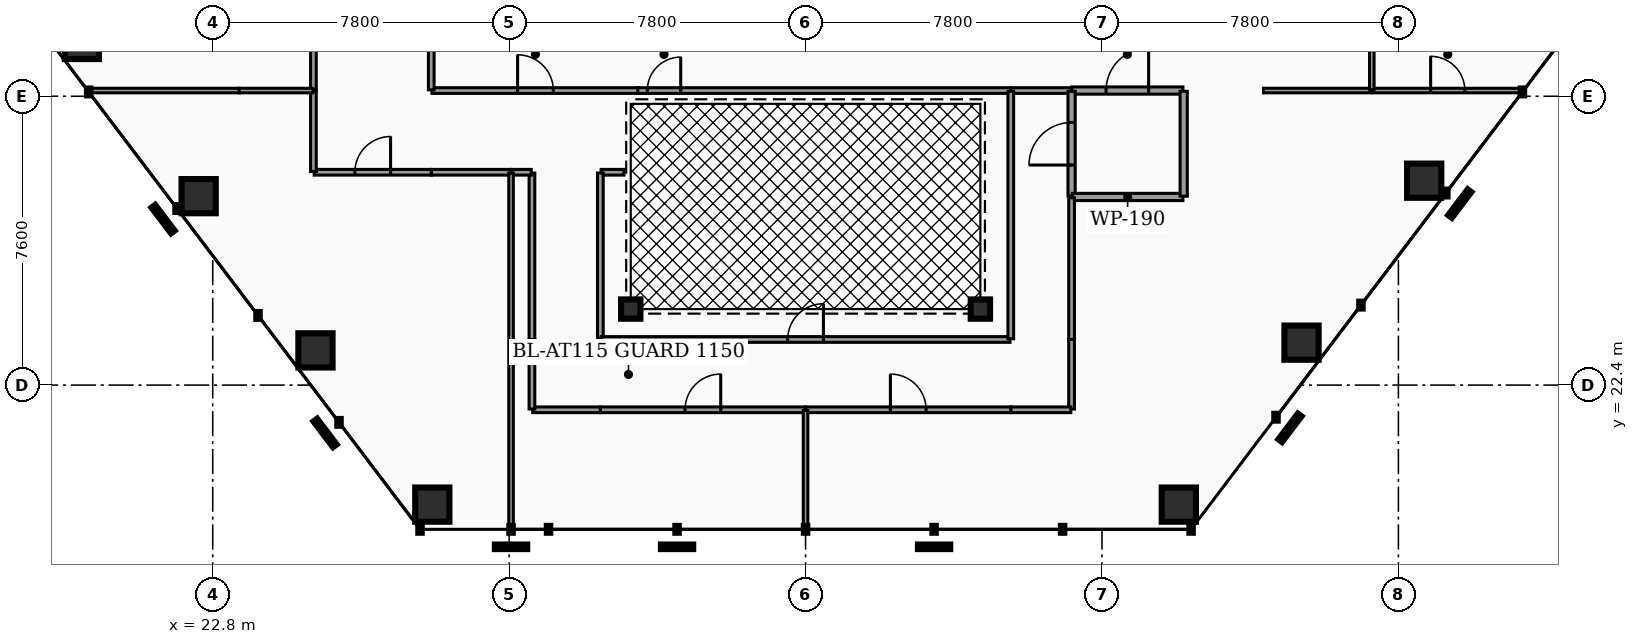
"""IFC4 building model, lengths in metres.
Left out: names, types, materials, properties, quantities, classifications, styles, units other than length and angle.
Written with IfcOpenShell. Run it as: python <this file> out.ifc"""

import sys

from ifc_helpers import new_model, si_unit, direction, frame, frame_2d, origin, origin_2d, place, context, subcontext, project, spatial, rectangle, hollow_rectangle, hollow_circle, extrude, element, fill, save


model = new_model("IFC4")
c1 = context("Model", 3, precision=1e-05, world=origin(), true_north=direction((0.0, 1.0)))
c2 = subcontext(c1, "Body", "Model", "MODEL_VIEW")
j1 = project(units=[si_unit("LENGTHUNIT", "METRE"), si_unit("PLANEANGLEUNIT", "RADIAN")], contexts=[c1])
p1 = place(None, origin())
s1 = spatial("IfcSite", under=j1, at=p1, CompositionType="ELEMENT")
p2 = place(p1, origin())
s2 = spatial("IfcBuilding", under=s1, at=p2, CompositionType="ELEMENT")
p3 = place(p2, frame((0.0, 0.0, 76.5)))
s3 = spatial("IfcBuildingStorey", under=s2, at=p3, CompositionType="ELEMENT", Elevation=76.5)
for number, where, z_axis, x_axis in (
    (1, (19.355, 31.429, 0.0), (0.0, 0.0, 1.0), (1.0, 0.0, 0.0)),
    (2, (22.429, 27.371, 0.0), (0.0, 0.0, 1.0), (1.0, 0.0, 0.0)),
    (3, (25.504, 23.313, 0.0), (0.0, 0.0, 1.0), (1.0, 0.0, 0.0)),
    (4, (28.578, 19.255, 0.0), (0.0, 0.0, 1.0), (1.0, 0.0, 0.0)),
    (5, (48.222, 19.255, 0.0), (0.0, 0.0, 1.0), (1.0, 0.0, 0.0)),
    (6, (51.451, 23.517, 0.0), (0.0, 0.0, 1.0), (1.0, 0.0, 0.0)),
    (7, (54.679, 27.778, 0.0), (0.0, 0.0, 1.0), (1.0, 0.0, 0.0)),
):
    element("IfcColumn", number, at=place(p3, frame(where, z_axis=z_axis, x_axis=x_axis)), inside=s3, PredefinedType="COLUMN", context=c2, shape_type="SweptSolid", body=[
        extrude(hollow_rectangle(XDim=0.9, YDim=0.9, WallThickness=0.045, at=origin_2d()), origin(), (0.0, 0.0, 1.0), 3.82),
    ])
for number, where, z_axis, x_axis in (
    (8, (33.8, 24.4, 0.0), (0.0, 0.0, 1.0), (1.0, 0.0, 0.0)),
    (9, (43.0, 24.4, 0.0), (0.0, 0.0, 1.0), (1.0, 0.0, 0.0)),
):
    element("IfcColumn", number, at=place(p3, frame(where, z_axis=z_axis, x_axis=x_axis)), inside=s3, PredefinedType="COLUMN", context=c2, shape_type="SweptSolid", body=[
        extrude(hollow_circle(Radius=0.254, WallThickness=0.02, at=origin_2d()), origin(), (0.0, 0.0, 1.0), 3.82),
    ])
p4 = place(p3, frame((45.405, 30.15, 0.0), z_axis=(0.0, 0.0, 1.0), x_axis=(1.0, 0.0, 0.0)))
e10 = element("IfcWall", 10, at=p4, inside=s3, PredefinedType="PARTITIONING", context=c2, shape_type="SweptSolid", body=[
    extrude(rectangle(XDim=2.925, YDim=0.19, at=frame_2d((1.462, 0.0))), origin(), (0.0, 0.0, 1.0), 2.777),
])
p5 = place(p4, frame((0.903, 0.0, 0.0)))
e11 = element("IfcOpeningElement", 11, at=p5, cuts=e10, PredefinedType="OPENING", context=c2, shape_type="SweptSolid", body=[
    extrude(rectangle(XDim=1.12, YDim=2.05, at=frame_2d((0.56, 1.025))), frame((0.0, 0.105, 0.0), z_axis=(0.0, -1.0, 0.0), x_axis=(1.0, 0.0, 0.0)), (0.0, 0.0, 1.0), 0.21),
])
p6 = place(p3, frame((43.805, 30.15, 0.0), z_axis=(0.0, 0.0, 1.0), x_axis=(1.0, 0.0, 0.0)))
e12 = element("IfcWall", 12, at=p6, inside=s3, PredefinedType="PARTITIONING", context=c2, shape_type="SweptSolid", body=[
    extrude(rectangle(XDim=1.59, YDim=0.15, at=frame_2d((0.795, 0.0))), origin(), (0.0, 0.0, 1.0), 2.777),
])
p7 = place(p3, frame((28.57, 30.15, 0.0), z_axis=(0.0, 0.0, 1.0), x_axis=(1.0, 0.0, 0.0)))
e13 = element("IfcWall", 13, at=p7, inside=s3, PredefinedType="PARTITIONING", context=c2, shape_type="SweptSolid", body=[
    extrude(rectangle(XDim=5.445, YDim=0.15, at=frame_2d((2.722, 0.0))), origin(), (0.0, 0.0, 1.0), 2.777),
])
p8 = place(p7, frame((2.252, 0.0, 0.0)))
e14 = element("IfcOpeningElement", 14, at=p8, cuts=e13, PredefinedType="OPENING", context=c2, shape_type="SweptSolid", body=[
    extrude(rectangle(XDim=0.94, YDim=2.05, at=frame_2d((0.47, 1.025))), frame((0.0, 0.085, 0.0), z_axis=(0.0, -1.0, 0.0), x_axis=(1.0, 0.0, 0.0)), (0.0, 0.0, 1.0), 0.17),
])
p9 = place(p3, frame((28.55, 30.17, 0.0), z_axis=(0.0, 0.0, 1.0), x_axis=(0.0, 1.0, 0.0)))
e15 = element("IfcWall", 15, at=p9, inside=s3, PredefinedType="PARTITIONING", context=c2, shape_type="SweptSolid", body=[
    extrude(rectangle(XDim=3.065, YDim=0.15, at=frame_2d((1.533, 0.0))), origin(), (0.0, 0.0, 1.0), 2.777),
])
p10 = place(p3, frame((33.985, 30.15, 0.0), z_axis=(0.0, 0.0, 1.0), x_axis=(1.0, 0.0, 0.0)))
e16 = element("IfcWall", 16, at=p10, inside=s3, PredefinedType="PARTITIONING", context=c2, shape_type="SweptSolid", body=[
    extrude(rectangle(XDim=9.81, YDim=0.15, at=frame_2d((4.905, 0.0))), origin(), (0.0, 0.0, 1.0), 2.777),
])
p11 = place(p10, frame((0.25, 0.0, 0.0)))
e17 = element("IfcOpeningElement", 17, at=p11, cuts=e16, PredefinedType="OPENING", context=c2, shape_type="SweptSolid", body=[
    extrude(rectangle(XDim=0.88, YDim=2.05, at=frame_2d((0.44, 1.025))), frame((0.0, 0.085, 0.0), z_axis=(0.0, -1.0, 0.0), x_axis=(1.0, 0.0, 0.0)), (0.0, 0.0, 1.0), 0.17),
])
p12 = place(p3, frame((45.4, 27.37, 0.0), z_axis=(0.0, 0.0, 1.0), x_axis=(0.0, 1.0, 0.0)))
e18 = element("IfcWall", 18, at=p12, inside=s3, PredefinedType="PARTITIONING", context=c2, shape_type="SweptSolid", body=[
    extrude(rectangle(XDim=2.76, YDim=0.19, at=frame_2d((1.38, 0.0))), origin(), (0.0, 0.0, 1.0), 2.777),
])
p13 = place(p12, frame((0.82, 0.0, 0.0)))
e19 = element("IfcOpeningElement", 19, at=p13, cuts=e18, PredefinedType="OPENING", context=c2, shape_type="SweptSolid", body=[
    extrude(rectangle(XDim=1.12, YDim=2.05, at=frame_2d((0.56, 1.025))), frame((0.0, 0.105, 0.0), z_axis=(0.0, -1.0, 0.0), x_axis=(1.0, 0.0, 0.0)), (0.0, 0.0, 1.0), 0.21),
])
p14 = place(p3, frame((45.42, 27.35, 0.0), z_axis=(0.0, 0.0, 1.0), x_axis=(1.0, 0.0, 0.0)))
e20 = element("IfcWall", 20, at=p14, inside=s3, PredefinedType="PARTITIONING", context=c2, shape_type="SweptSolid", body=[
    extrude(rectangle(XDim=2.91, YDim=0.19, at=frame_2d((1.455, 0.0))), origin(), (0.0, 0.0, 1.0), 2.777),
])
p15 = place(p3, frame((48.35, 27.37, 0.0), z_axis=(0.0, 0.0, 1.0), x_axis=(0.0, 1.0, 0.0)))
e21 = element("IfcWall", 21, at=p15, inside=s3, PredefinedType="PARTITIONING", context=c2, shape_type="SweptSolid", body=[
    extrude(rectangle(XDim=2.76, YDim=0.19, at=frame_2d((1.38, 0.0))), origin(), (0.0, 0.0, 1.0), 2.777),
])
p16 = place(p3, frame((33.0, 21.75, 0.0), z_axis=(0.0, 0.0, 1.0), x_axis=(1.0, 0.0, 0.0)))
e22 = element("IfcWall", 22, at=p16, inside=s3, PredefinedType="PARTITIONING", context=c2, shape_type="SweptSolid", body=[
    extrude(rectangle(XDim=5.395, YDim=0.15, at=frame_2d((2.698, 0.0))), origin(), (0.0, 0.0, 1.0), 2.777),
])
p17 = place(p16, frame((2.228, 0.0, 0.0)))
e23 = element("IfcOpeningElement", 23, at=p17, cuts=e22, PredefinedType="OPENING", context=c2, shape_type="SweptSolid", body=[
    extrude(rectangle(XDim=0.94, YDim=2.05, at=frame_2d((0.47, 1.025))), frame((0.0, 0.085, 0.0), z_axis=(0.0, -1.0, 0.0), x_axis=(1.0, 0.0, 0.0)), (0.0, 0.0, 1.0), 0.17),
])
p18 = place(p3, frame((31.22, 21.75, 0.0), z_axis=(0.0, 0.0, 1.0), x_axis=(1.0, 0.0, 0.0)))
e24 = element("IfcWall", 24, at=p18, inside=s3, PredefinedType="PARTITIONING", context=c2, shape_type="SweptSolid", body=[
    extrude(rectangle(XDim=1.78, YDim=0.15, at=frame_2d((0.89, 0.0))), origin(), (0.0, 0.0, 1.0), 2.777),
])
p19 = place(p3, frame((31.2, 21.77, 0.0), z_axis=(0.0, 0.0, 1.0), x_axis=(0.0, 1.0, 0.0)))
e25 = element("IfcWall", 25, at=p19, inside=s3, PredefinedType="PARTITIONING", context=c2, shape_type="SweptSolid", body=[
    extrude(rectangle(XDim=1.83, YDim=0.15, at=frame_2d((0.915, 0.0))), origin(), (0.0, 0.0, 1.0), 2.777),
])
p20 = place(p3, frame((31.2, 23.6, 0.0), z_axis=(0.0, 0.0, 1.0), x_axis=(0.0, 1.0, 0.0)))
e26 = element("IfcWall", 26, at=p20, inside=s3, PredefinedType="PARTITIONING", context=c2, shape_type="SweptSolid", body=[
    extrude(rectangle(XDim=4.38, YDim=0.15, at=frame_2d((2.19, 0.0))), origin(), (0.0, 0.0, 1.0), 2.777),
])
p21 = place(p3, frame((30.655, 28.0, 0.0), z_axis=(0.0, 0.0, 1.0), x_axis=(1.0, 0.0, 0.0)))
e27 = element("IfcWall", 27, at=p21, inside=s3, PredefinedType="PARTITIONING", context=c2, shape_type="SweptSolid", body=[
    extrude(rectangle(XDim=0.525, YDim=0.15, at=frame_2d((0.262, 0.0))), origin(), (0.0, 0.0, 1.0), 2.777),
])
p22 = place(p3, frame((45.4, 23.6, 0.0), z_axis=(0.0, 0.0, 1.0), x_axis=(0.0, 1.0, 0.0)))
e28 = element("IfcWall", 28, at=p22, inside=s3, PredefinedType="PARTITIONING", context=c2, shape_type="SweptSolid", body=[
    extrude(rectangle(XDim=3.73, YDim=0.15, at=frame_2d((1.865, 0.0))), origin(), (0.0, 0.0, 1.0), 2.777),
])
p23 = place(p3, frame((45.4, 21.77, 0.0), z_axis=(0.0, 0.0, 1.0), x_axis=(0.0, 1.0, 0.0)))
e29 = element("IfcWall", 29, at=p23, inside=s3, PredefinedType="PARTITIONING", context=c2, shape_type="SweptSolid", body=[
    extrude(rectangle(XDim=1.83, YDim=0.15, at=frame_2d((0.915, 0.0))), origin(), (0.0, 0.0, 1.0), 2.777),
])
p24 = place(p3, frame((43.8, 21.75, 0.0), z_axis=(0.0, 0.0, 1.0), x_axis=(1.0, 0.0, 0.0)))
e30 = element("IfcWall", 30, at=p24, inside=s3, PredefinedType="PARTITIONING", context=c2, shape_type="SweptSolid", body=[
    extrude(rectangle(XDim=1.58, YDim=0.15, at=frame_2d((0.79, 0.0))), origin(), (0.0, 0.0, 1.0), 2.777),
])
p25 = place(p3, frame((38.405, 21.75, 0.0), z_axis=(0.0, 0.0, 1.0), x_axis=(1.0, 0.0, 0.0)))
e31 = element("IfcWall", 31, at=p25, inside=s3, PredefinedType="PARTITIONING", context=c2, shape_type="SweptSolid", body=[
    extrude(rectangle(XDim=5.395, YDim=0.15, at=frame_2d((2.698, 0.0))), origin(), (0.0, 0.0, 1.0), 2.777),
])
p26 = place(p25, frame((2.228, 0.0, 0.0)))
e32 = element("IfcOpeningElement", 32, at=p26, cuts=e31, PredefinedType="OPENING", context=c2, shape_type="SweptSolid", body=[
    extrude(rectangle(XDim=0.94, YDim=2.05, at=frame_2d((0.47, 1.025))), frame((0.0, 0.085, 0.0), z_axis=(0.0, -1.0, 0.0), x_axis=(1.0, 0.0, 0.0)), (0.0, 0.0, 1.0), 0.17),
])
p27 = place(p3, frame((28.55, 28.0, 0.0), z_axis=(0.0, 0.0, 1.0), x_axis=(1.0, 0.0, 0.0)))
e33 = element("IfcWall", 33, at=p27, inside=s3, PredefinedType="PARTITIONING", context=c2, shape_type="SweptSolid", body=[
    extrude(rectangle(XDim=2.095, YDim=0.15, at=frame_2d((1.047, 0.0))), origin(), (0.0, 0.0, 1.0), 2.777),
])
p28 = place(p3, frame((25.47, 28.0, 0.0), z_axis=(0.0, 0.0, 1.0), x_axis=(1.0, 0.0, 0.0)))
e34 = element("IfcWall", 34, at=p28, inside=s3, PredefinedType="PARTITIONING", context=c2, shape_type="SweptSolid", body=[
    extrude(rectangle(XDim=3.08, YDim=0.15, at=frame_2d((1.54, 0.0))), origin(), (0.0, 0.0, 1.0), 2.777),
])
p29 = place(p28, frame((1.07, 0.0, 0.0)))
e35 = element("IfcOpeningElement", 35, at=p29, cuts=e34, PredefinedType="OPENING", context=c2, shape_type="SweptSolid", body=[
    extrude(rectangle(XDim=0.94, YDim=2.05, at=frame_2d((0.47, 1.025))), frame((0.0, 0.085, 0.0), z_axis=(0.0, -1.0, 0.0), x_axis=(1.0, 0.0, 0.0)), (0.0, 0.0, 1.0), 0.17),
])
p30 = place(p3, frame((25.45, 28.02, 0.0), z_axis=(0.0, 0.0, 1.0), x_axis=(0.0, 1.0, 0.0)))
e36 = element("IfcWall", 36, at=p30, inside=s3, PredefinedType="PARTITIONING", context=c2, shape_type="SweptSolid", body=[
    extrude(rectangle(XDim=2.11, YDim=0.15, at=frame_2d((1.055, 0.0))), origin(), (0.0, 0.0, 1.0), 2.777),
])
p31 = place(p3, frame((25.45, 30.17, 0.0), z_axis=(0.0, 0.0, 1.0), x_axis=(0.0, 1.0, 0.0)))
e37 = element("IfcWall", 37, at=p31, inside=s3, PredefinedType="PARTITIONING", context=c2, shape_type="SweptSolid", body=[
    extrude(rectangle(XDim=3.115, YDim=0.15, at=frame_2d((1.558, 0.0))), origin(), (0.0, 0.0, 1.0), 2.777),
])
p32 = place(p31, frame((1.087, 0.0, 0.0)))
e38 = element("IfcOpeningElement", 38, at=p32, cuts=e37, PredefinedType="OPENING", context=c2, shape_type="SweptSolid", body=[
    extrude(rectangle(XDim=0.94, YDim=2.05, at=frame_2d((0.47, 1.025))), frame((0.0, 0.085, 0.0), z_axis=(0.0, -1.0, 0.0), x_axis=(1.0, 0.0, 0.0)), (0.0, 0.0, 1.0), 0.17),
])
p33 = place(p3, frame((33.02, 28.0, 0.0), z_axis=(0.0, 0.0, 1.0), x_axis=(1.0, 0.0, 0.0)))
e39 = element("IfcWall", 39, at=p33, inside=s3, PredefinedType="PARTITIONING", context=c2, shape_type="SweptSolid", body=[
    extrude(rectangle(XDim=0.6, YDim=0.15, at=frame_2d((0.3, 0.0))), origin(), (0.0, 0.0, 1.0), 2.777),
])
p34 = place(p3, frame((33.0, 23.62, 0.0), z_axis=(0.0, 0.0, 1.0), x_axis=(0.0, 1.0, 0.0)))
e40 = element("IfcWall", 40, at=p34, inside=s3, PredefinedType="PARTITIONING", context=c2, shape_type="SweptSolid", body=[
    extrude(rectangle(XDim=4.36, YDim=0.15, at=frame_2d((2.18, 0.0))), origin(), (0.0, 0.0, 1.0), 2.777),
])
p35 = place(p3, frame((33.02, 23.6, 0.0), z_axis=(0.0, 0.0, 1.0), x_axis=(1.0, 0.0, 0.0)))
e41 = element("IfcWall", 41, at=p35, inside=s3, PredefinedType="PARTITIONING", context=c2, shape_type="SweptSolid", body=[
    extrude(rectangle(XDim=10.76, YDim=0.15, at=frame_2d((5.38, 0.0))), origin(), (0.0, 0.0, 1.0), 2.777),
])
p36 = place(p35, frame((4.91, 0.0, 0.0)))
e42 = element("IfcOpeningElement", 42, at=p36, cuts=e41, PredefinedType="OPENING", context=c2, shape_type="SweptSolid", body=[
    extrude(rectangle(XDim=0.94, YDim=2.05, at=frame_2d((0.47, 1.025))), frame((0.0, 0.085, 0.0), z_axis=(0.0, -1.0, 0.0), x_axis=(1.0, 0.0, 0.0)), (0.0, 0.0, 1.0), 0.17),
])
p37 = place(p3, frame((43.8, 23.62, 0.0), z_axis=(0.0, 0.0, 1.0), x_axis=(0.0, 1.0, 0.0)))
e43 = element("IfcWall", 43, at=p37, inside=s3, PredefinedType="PARTITIONING", context=c2, shape_type="SweptSolid", body=[
    extrude(rectangle(XDim=6.51, YDim=0.15, at=frame_2d((3.255, 0.0))), origin(), (0.0, 0.0, 1.0), 2.777),
])
p38 = place(p3, frame((38.4, 18.62, 0.0), z_axis=(0.0, 0.0, 1.0), x_axis=(0.0, 1.0, 0.0)))
e44 = element("IfcWall", 44, at=p38, inside=s3, PredefinedType="PARTITIONING", context=c2, shape_type="SweptSolid", body=[
    extrude(rectangle(XDim=3.11, YDim=0.12, at=frame_2d((1.555, 0.0))), origin(), (0.0, 0.0, 1.0), 2.777),
])
p39 = place(p3, frame((30.65, 18.62, 0.0), z_axis=(0.0, 0.0, 1.0), x_axis=(0.0, 1.0, 0.0)))
e45 = element("IfcWall", 45, at=p39, inside=s3, PredefinedType="PARTITIONING", context=c2, shape_type="SweptSolid", body=[
    extrude(rectangle(XDim=9.36, YDim=0.12, at=frame_2d((4.68, 0.0))), origin(), (0.0, 0.0, 1.0), 2.777),
])
p40 = place(p3, frame((53.32, 30.15, 0.0), z_axis=(0.0, 0.0, 1.0), x_axis=(1.0, 0.0, 0.0)))
e46 = element("IfcWall", 46, at=p40, inside=s3, PredefinedType="PARTITIONING", context=c2, shape_type="SweptSolid", body=[
    extrude(rectangle(XDim=3.956, YDim=0.12, at=frame_2d((1.978, 0.0))), origin(), (0.0, 0.0, 1.0), 2.777),
])
p41 = place(p40, frame((1.528, 0.0, 0.0)))
e47 = element("IfcOpeningElement", 47, at=p41, cuts=e46, PredefinedType="OPENING", context=c2, shape_type="SweptSolid", body=[
    extrude(rectangle(XDim=0.9, YDim=2.05, at=frame_2d((0.45, 1.025))), frame((0.0, 0.07, 0.0), z_axis=(0.0, -1.0, 0.0), x_axis=(1.0, 0.0, 0.0)), (0.0, 0.0, 1.0), 0.14),
])
p42 = place(p3, frame((50.45, 30.15, 0.0), z_axis=(0.0, 0.0, 1.0), x_axis=(1.0, 0.0, 0.0)))
e48 = element("IfcWall", 48, at=p42, inside=s3, PredefinedType="PARTITIONING", context=c2, shape_type="SweptSolid", body=[
    extrude(rectangle(XDim=2.83, YDim=0.12, at=frame_2d((1.415, 0.0))), origin(), (0.0, 0.0, 1.0), 2.777),
])
p43 = place(p3, frame((19.524, 30.15, 0.0), z_axis=(0.0, 0.0, 1.0), x_axis=(1.0, 0.0, 0.0)))
e49 = element("IfcWall", 49, at=p43, inside=s3, PredefinedType="PARTITIONING", context=c2, shape_type="SweptSolid", body=[
    extrude(rectangle(XDim=3.976, YDim=0.12, at=frame_2d((1.988, 0.0))), origin(), (0.0, 0.0, 1.0), 2.777),
])
p44 = place(p3, frame((23.5, 30.15, 0.0), z_axis=(0.0, 0.0, 1.0), x_axis=(1.0, 0.0, 0.0)))
e50 = element("IfcWall", 50, at=p44, inside=s3, PredefinedType="PARTITIONING", context=c2, shape_type="SweptSolid", body=[
    extrude(rectangle(XDim=1.93, YDim=0.12, at=frame_2d((0.965, 0.0))), origin(), (0.0, 0.0, 1.0), 2.777),
])
p45 = place(p3, frame((53.3, 30.17, 0.0), z_axis=(0.0, 0.0, 1.0), x_axis=(0.0, 1.0, 0.0)))
e51 = element("IfcWall", 51, at=p45, inside=s3, PredefinedType="PARTITIONING", context=c2, shape_type="SweptSolid", body=[
    extrude(rectangle(XDim=17.537, YDim=0.12, at=frame_2d((8.769, 0.0))), origin(), (0.0, 0.0, 1.0), 2.777),
])
p46 = place(p5, origin())
e52 = element("IfcDoor", 52, at=p46, inside=s3, OperationType="SINGLE_SWING_RIGHT", PredefinedType="DOOR", context=c2, shape_type="SweptSolid", body=[
    extrude(rectangle(XDim=1.12, YDim=2.05, at=frame_2d((0.56, 1.025))), frame((0.0, 0.025, 0.0), z_axis=(0.0, -1.0, 0.0), x_axis=(1.0, 0.0, 0.0)), (0.0, 0.0, 1.0), 0.05),
])
fill(e11, e52)
p47 = place(p8, origin())
e53 = element("IfcDoor", 53, at=p47, inside=s3, OperationType="SINGLE_SWING_LEFT", PredefinedType="DOOR", context=c2, shape_type="SweptSolid", body=[
    extrude(rectangle(XDim=0.94, YDim=2.05, at=frame_2d((0.47, 1.025))), frame((0.0, 0.025, 0.0), z_axis=(0.0, -1.0, 0.0), x_axis=(1.0, 0.0, 0.0)), (0.0, 0.0, 1.0), 0.05),
])
fill(e14, e53)
p48 = place(p11, origin())
e54 = element("IfcDoor", 54, at=p48, inside=s3, OperationType="SINGLE_SWING_RIGHT", PredefinedType="DOOR", context=c2, shape_type="SweptSolid", body=[
    extrude(rectangle(XDim=0.88, YDim=2.05, at=frame_2d((0.44, 1.025))), frame((0.0, 0.025, 0.0), z_axis=(0.0, -1.0, 0.0), x_axis=(1.0, 0.0, 0.0)), (0.0, 0.0, 1.0), 0.05),
])
fill(e17, e54)
p49 = place(p13, origin())
e55 = element("IfcDoor", 55, at=p49, inside=s3, OperationType="SINGLE_SWING_LEFT", PredefinedType="DOOR", context=c2, shape_type="SweptSolid", body=[
    extrude(rectangle(XDim=1.12, YDim=2.05, at=frame_2d((0.56, 1.025))), frame((0.0, 0.025, 0.0), z_axis=(0.0, -1.0, 0.0), x_axis=(1.0, 0.0, 0.0)), (0.0, 0.0, 1.0), 0.05),
])
fill(e19, e55)
p50 = place(p17, origin())
e56 = element("IfcDoor", 56, at=p50, inside=s3, OperationType="SINGLE_SWING_RIGHT", PredefinedType="DOOR", context=c2, shape_type="SweptSolid", body=[
    extrude(rectangle(XDim=0.94, YDim=2.05, at=frame_2d((0.47, 1.025))), frame((0.0, 0.025, 0.0), z_axis=(0.0, -1.0, 0.0), x_axis=(1.0, 0.0, 0.0)), (0.0, 0.0, 1.0), 0.05),
])
fill(e23, e56)
p51 = place(p26, origin())
e57 = element("IfcDoor", 57, at=p51, inside=s3, OperationType="SINGLE_SWING_LEFT", PredefinedType="DOOR", context=c2, shape_type="SweptSolid", body=[
    extrude(rectangle(XDim=0.94, YDim=2.05, at=frame_2d((0.47, 1.025))), frame((0.0, 0.025, 0.0), z_axis=(0.0, -1.0, 0.0), x_axis=(1.0, 0.0, 0.0)), (0.0, 0.0, 1.0), 0.05),
])
fill(e32, e57)
p52 = place(p29, origin())
e58 = element("IfcDoor", 58, at=p52, inside=s3, OperationType="SINGLE_SWING_RIGHT", PredefinedType="DOOR", context=c2, shape_type="SweptSolid", body=[
    extrude(rectangle(XDim=0.94, YDim=2.05, at=frame_2d((0.47, 1.025))), frame((0.0, 0.025, 0.0), z_axis=(0.0, -1.0, 0.0), x_axis=(1.0, 0.0, 0.0)), (0.0, 0.0, 1.0), 0.05),
])
fill(e35, e58)
p53 = place(p36, origin())
e59 = element("IfcDoor", 59, at=p53, inside=s3, OperationType="SINGLE_SWING_RIGHT", PredefinedType="DOOR", context=c2, shape_type="SweptSolid", body=[
    extrude(rectangle(XDim=0.94, YDim=2.05, at=frame_2d((0.47, 1.025))), frame((0.0, 0.025, 0.0), z_axis=(0.0, -1.0, 0.0), x_axis=(1.0, 0.0, 0.0)), (0.0, 0.0, 1.0), 0.05),
])
fill(e42, e59)
p54 = place(p41, origin())
e60 = element("IfcDoor", 60, at=p54, inside=s3, OperationType="SINGLE_SWING_LEFT", PredefinedType="DOOR", context=c2, shape_type="SweptSolid", body=[
    extrude(rectangle(XDim=0.9, YDim=2.05, at=frame_2d((0.45, 1.025))), frame((0.0, 0.025, 0.0), z_axis=(0.0, -1.0, 0.0), x_axis=(1.0, 0.0, 0.0)), (0.0, 0.0, 1.0), 0.05),
])
fill(e47, e60)
save(model, sys.argv[1])
